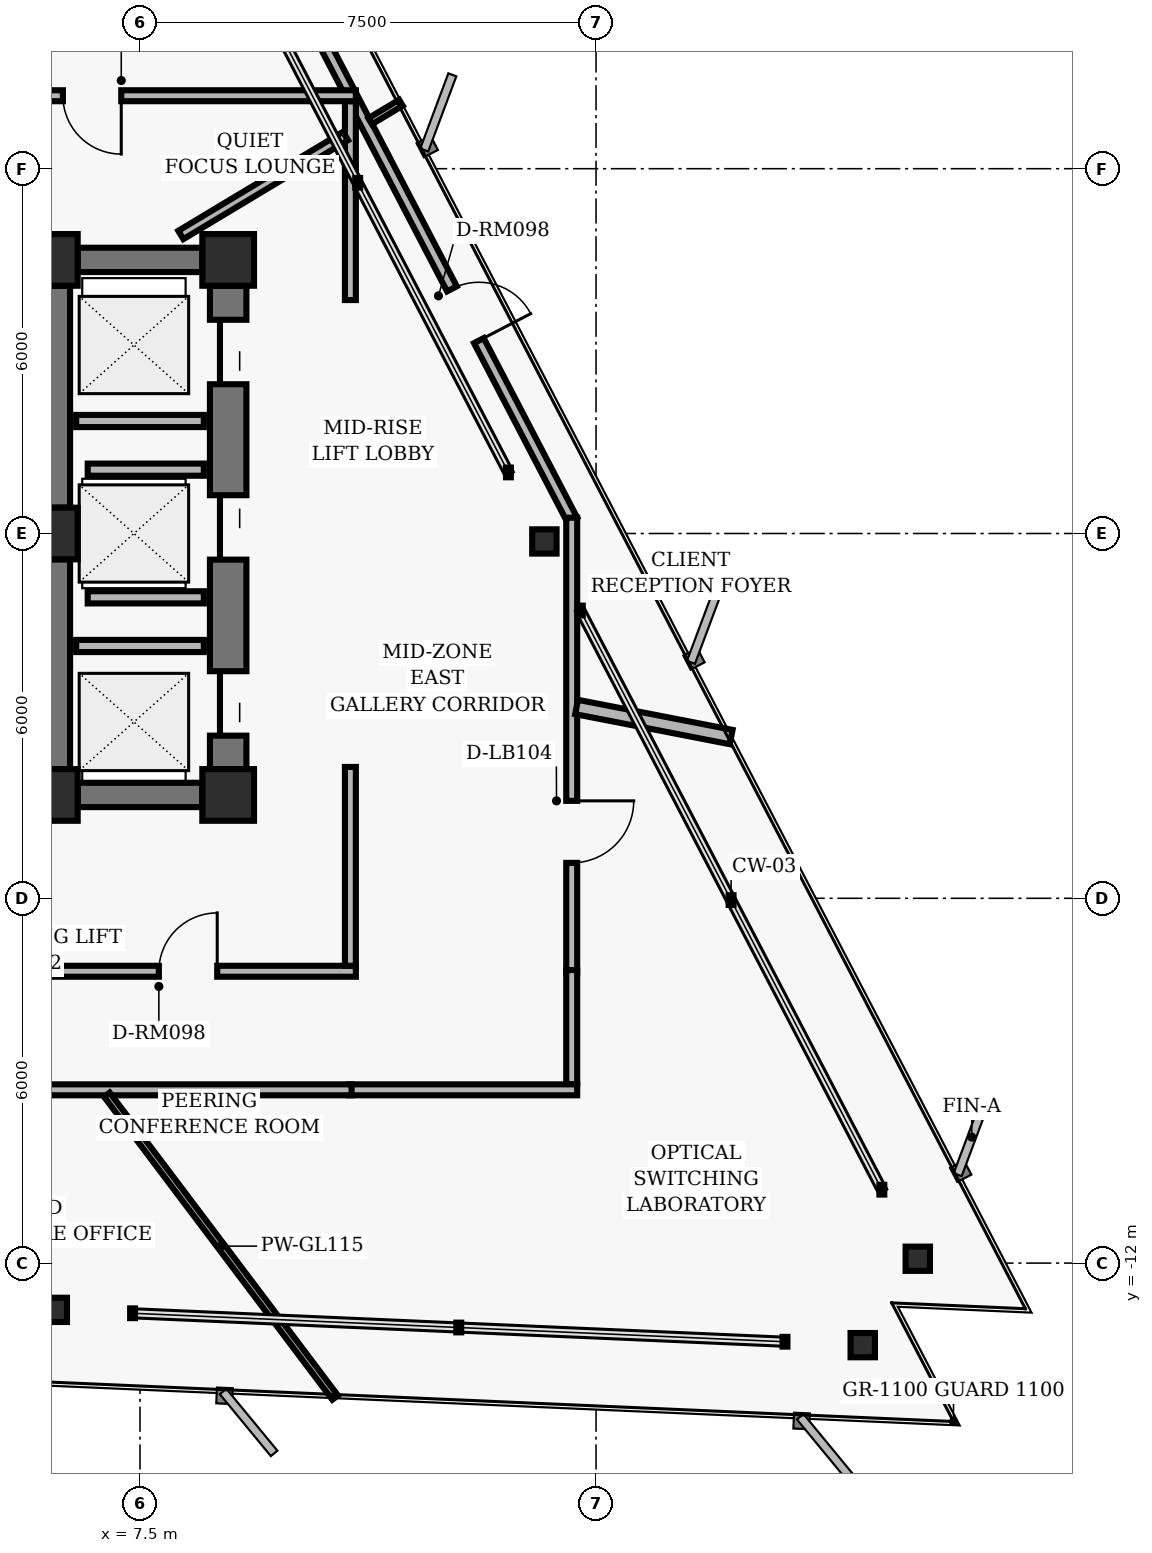
"""IFC4 building model, lengths in metres.
Left out: names, types, materials, properties, quantities, classifications, styles, units other than length and angle.
Written with IfcOpenShell. Run it as: python <this file> out.ifc"""

import sys

from ifc_helpers import new_model, si_unit, direction, frame, frame_2d, origin, origin_2d, place, context, subcontext, project, spatial, rectangle, hollow_rectangle, i_section, extrude, element, fill, save


model = new_model("IFC4")
c1 = context("Model", 3, precision=1e-05, world=origin(), true_north=direction((0.0, 1.0)))
c2 = subcontext(c1, "Body", "Model", "MODEL_VIEW")
j1 = project(units=[si_unit("LENGTHUNIT", "METRE"), si_unit("PLANEANGLEUNIT", "RADIAN")], contexts=[c1])
p1 = place(None, origin())
s1 = spatial("IfcSite", under=j1, at=p1, CompositionType="ELEMENT")
p2 = place(p1, origin())
s2 = spatial("IfcBuilding", under=s1, at=p2, CompositionType="ELEMENT")
p3 = place(p2, frame((0.0, 0.0, 144.16)))
s3 = spatial("IfcBuildingStorey", under=s2, at=p3, CompositionType="ELEMENT", Elevation=144.16)
for number, where, z_axis, x_axis in (
    (1, (6.05, 4.5, 0.0), (0.0, 0.0, 1.0), (1.0, 0.0, 0.0)),
    (2, (6.05, 0.0, 0.0), (0.0, 0.0, 1.0), (1.0, 0.0, 0.0)),
    (3, (6.05, -4.3, 0.0), (0.0, 0.0, 1.0), (1.0, 0.0, 0.0)),
    (4, (8.95, 4.5, 0.0), (0.0, 0.0, 1.0), (1.0, 0.0, 0.0)),
    (5, (8.95, -4.3, 0.0), (0.0, 0.0, 1.0), (1.0, 0.0, 0.0)),
):
    element("IfcColumn", number, at=place(p3, frame(where, z_axis=z_axis, x_axis=x_axis)), inside=s3, PredefinedType="COLUMN", context=c2, shape_type="SweptSolid", body=[
        extrude(hollow_rectangle(XDim=0.85, YDim=0.85, WallThickness=0.055, InnerFilletRadius=0.02, OuterFilletRadius=0.04, at=origin_2d()), origin(), (0.0, 0.0, 1.0), 3.04),
    ])
p4 = place(p3, frame((6.05, 0.425, 0.0), z_axis=(0.0, 0.0, 1.0), x_axis=(0.0, 1.0, 0.0)))
e6 = element("IfcWall", 6, at=p4, inside=s3, PredefinedType="SHEAR", context=c2, shape_type="SweptSolid", body=[
    extrude(rectangle(XDim=3.65, YDim=0.6, at=frame_2d((1.825, 0.0))), origin(), (0.0, 0.0, 1.0), 2.618),
])
p5 = place(p3, frame((6.05, -3.875, 0.0), z_axis=(0.0, 0.0, 1.0), x_axis=(0.0, 1.0, 0.0)))
e7 = element("IfcWall", 7, at=p5, inside=s3, PredefinedType="SHEAR", context=c2, shape_type="SweptSolid", body=[
    extrude(rectangle(XDim=3.45, YDim=0.6, at=frame_2d((1.725, 0.0))), origin(), (0.0, 0.0, 1.0), 2.618),
])
p6 = place(p3, frame((8.95, -3.875, 0.0), z_axis=(0.0, 0.0, 1.0), x_axis=(0.0, 1.0, 0.0)))
e8 = element("IfcWall", 8, at=p6, inside=s3, PredefinedType="SHEAR", context=c2, shape_type="SweptSolid", body=[
    extrude(rectangle(XDim=7.95, YDim=0.6, at=frame_2d((3.975, 0.0))), origin(), (0.0, 0.0, 1.0), 2.618),
])
p7 = place(p6, frame((0.55, 0.0, 0.0)))
e9 = element("IfcOpeningElement", 9, at=p7, cuts=e8, PredefinedType="OPENING", context=c2, shape_type="SweptSolid", body=[
    extrude(rectangle(XDim=1.06, YDim=2.04, at=frame_2d((0.53, 1.02))), frame((0.0, 0.31, 0.0), z_axis=(0.0, -1.0, 0.0), x_axis=(1.0, 0.0, 0.0)), (0.0, 0.0, 1.0), 0.62),
])
p8 = place(p6, frame((3.445, 0.0, 0.0)))
e10 = element("IfcOpeningElement", 10, at=p8, cuts=e8, PredefinedType="OPENING", context=c2, shape_type="SweptSolid", body=[
    extrude(rectangle(XDim=1.06, YDim=2.04, at=frame_2d((0.53, 1.02))), frame((0.0, 0.31, 0.0), z_axis=(0.0, -1.0, 0.0), x_axis=(1.0, 0.0, 0.0)), (0.0, 0.0, 1.0), 0.62),
])
p9 = place(p6, frame((6.33, 0.0, 0.0)))
e11 = element("IfcOpeningElement", 11, at=p9, cuts=e8, PredefinedType="OPENING", context=c2, shape_type="SweptSolid", body=[
    extrude(rectangle(XDim=1.06, YDim=2.04, at=frame_2d((0.53, 1.02))), frame((0.0, 0.31, 0.0), z_axis=(0.0, -1.0, 0.0), x_axis=(1.0, 0.0, 0.0)), (0.0, 0.0, 1.0), 0.62),
])
for number, where, z_axis, x_axis in (
    (12, (6.475, 4.5, 0.0), (0.0, 0.0, 1.0), (1.0, 0.0, 0.0)),
    (13, (6.475, -4.3, 0.0), (0.0, 0.0, 1.0), (1.0, 0.0, 0.0)),
):
    element("IfcWall", number, at=place(p3, frame(where, z_axis=z_axis, x_axis=x_axis)), inside=s3, PredefinedType="SHEAR", context=c2, shape_type="SweptSolid", body=[
        extrude(rectangle(XDim=2.05, YDim=0.4, at=frame_2d((1.025, 0.0))), origin(), (0.0, 0.0, 1.0), 2.618),
    ])
for number, where, z_axis, x_axis in (
    (14, (20.292, -11.928, 0.0), (0.0, 0.0, 1.0), (1.0, 0.0, 0.0)),
    (15, (14.15, -0.131, 0.0), (0.0, 0.0, 1.0), (1.0, 0.0, 0.0)),
    (16, (6.099, -12.769, 0.0), (0.0, 0.0, 1.0), (1.0, 0.0, 0.0)),
    (17, (19.386, -13.349, 0.0), (0.0, 0.0, 1.0), (1.0, 0.0, 0.0)),
):
    element("IfcColumn", number, at=place(p3, frame(where, z_axis=z_axis, x_axis=x_axis)), inside=s3, PredefinedType="COLUMN", context=c2, shape_type="SweptSolid", body=[
        extrude(i_section(OverallWidth=0.401, OverallDepth=0.399, WebThickness=0.025, FlangeThickness=0.04, FilletRadius=0.018, at=origin_2d()), origin(), (0.0, 0.0, 1.0), 3.04),
    ])
for number, where, z_axis, x_axis in (
    (18, (6.45, -1.85, 0.0), (0.0, 0.0, 1.0), (1.0, 0.0, 0.0)),
    (19, (6.45, 1.85, 0.0), (0.0, 0.0, 1.0), (1.0, 0.0, 0.0)),
):
    element("IfcWall", number, at=place(p3, frame(where, z_axis=z_axis, x_axis=x_axis)), inside=s3, PredefinedType="PARTITIONING", context=c2, shape_type="SweptSolid", body=[
        extrude(rectangle(XDim=2.1, YDim=0.2, at=frame_2d((1.05, 0.0))), origin(), (0.0, 0.0, 1.0), 2.593),
    ])
for number, where, z_axis, x_axis in (
    (20, (6.64, -1.05, 0.0), (0.0, 0.0, 1.0), (1.0, 0.0, 0.0)),
    (21, (6.64, 1.05, 0.0), (0.0, 0.0, 1.0), (1.0, 0.0, 0.0)),
):
    element("IfcWall", number, at=place(p3, frame(where, z_axis=z_axis, x_axis=x_axis)), inside=s3, PredefinedType="PARTITIONING", context=c2, shape_type="SweptSolid", body=[
        extrude(rectangle(XDim=1.91, YDim=0.2, at=frame_2d((0.955, 0.0))), origin(), (0.0, 0.0, 1.0), 2.593),
    ])
p10 = place(p3, frame((10.003, 9.07, 0.0), z_axis=(0.0, 0.0, 1.0), x_axis=(0.461740291408, -0.887015165198, 0.0)))
e22 = element("IfcWall", 22, at=p10, inside=s3, PredefinedType="PARTITIONING", context=c2, shape_type="SweptSolid", body=[
    extrude(rectangle(XDim=9.976, YDim=0.18, at=frame_2d((4.988, 0.0))), origin(), (0.0, 0.0, 1.0), 2.593),
])
p11 = place(p10, frame((5.689, 0.0, 0.0)))
e23 = element("IfcOpeningElement", 23, at=p11, cuts=e22, PredefinedType="OPENING", context=c2, shape_type="SweptSolid", body=[
    extrude(rectangle(XDim=0.96, YDim=2.02, at=frame_2d((0.48, 1.01))), frame((0.0, 0.1, 0.0), z_axis=(0.0, -1.0, 0.0), x_axis=(1.0, 0.0, 0.0)), (0.0, 0.0, 1.0), 0.2),
])
p12 = place(p3, frame((14.6, 0.26, 0.0), z_axis=(0.0, 0.0, 1.0), x_axis=(0.0, -1.0, 0.0)))
e24 = element("IfcWall", 24, at=p12, inside=s3, PredefinedType="PARTITIONING", context=c2, shape_type="SweptSolid", body=[
    extrude(rectangle(XDim=7.479, YDim=0.18, at=frame_2d((3.74, 0.0))), origin(), (0.0, 0.0, 1.0), 2.593),
])
p13 = place(p12, frame((4.657, 0.0, 0.0)))
e25 = element("IfcOpeningElement", 25, at=p13, cuts=e24, PredefinedType="OPENING", context=c2, shape_type="SweptSolid", body=[
    extrude(rectangle(XDim=1.02, YDim=2.02, at=frame_2d((0.51, 1.01))), frame((0.0, 0.1, 0.0), z_axis=(0.0, -1.0, 0.0), x_axis=(1.0, 0.0, 0.0)), (0.0, 0.0, 1.0), 0.2),
])
p14 = place(p3, frame((14.6, -7.18, 0.0), z_axis=(0.0, 0.0, 1.0), x_axis=(0.0, -1.0, 0.0)))
e26 = element("IfcWall", 26, at=p14, inside=s3, PredefinedType="PARTITIONING", context=c2, shape_type="SweptSolid", body=[
    extrude(rectangle(XDim=1.88, YDim=0.18, at=frame_2d((0.94, 0.0))), origin(), (0.0, 0.0, 1.0), 2.593),
])
p15 = place(p3, frame((14.69, -9.15, 0.0), z_axis=(0.0, 0.0, 1.0), x_axis=(-1.0, 0.0, 0.0)))
e27 = element("IfcWall", 27, at=p15, inside=s3, PredefinedType="PARTITIONING", context=c2, shape_type="SweptSolid", body=[
    extrude(rectangle(XDim=3.75, YDim=0.18, at=frame_2d((1.875, 0.0))), origin(), (0.0, 0.0, 1.0), 2.16),
])
p16 = place(p3, frame((10.98, -9.15, 0.0), z_axis=(0.0, 0.0, 1.0), x_axis=(-1.0, 0.0, 0.0)))
e28 = element("IfcWall", 28, at=p16, inside=s3, PredefinedType="PARTITIONING", context=c2, shape_type="SweptSolid", body=[
    extrude(rectangle(XDim=17.5, YDim=0.18, at=frame_2d((8.75, 0.0))), origin(), (0.0, 0.0, 1.0), 2.16),
])
p17 = place(p16, frame((13.872, 0.0, 0.0)))
e29 = element("IfcOpeningElement", 29, at=p17, cuts=e28, PredefinedType="OPENING", context=c2, shape_type="SweptSolid", body=[
    extrude(rectangle(XDim=0.96, YDim=2.02, at=frame_2d((0.48, 1.01))), frame((0.0, 0.1, 0.0), z_axis=(0.0, -1.0, 0.0), x_axis=(1.0, 0.0, 0.0)), (0.0, 0.0, 1.0), 0.2),
])
p18 = place(p16, frame((7.256, 0.0, 0.0)))
e30 = element("IfcOpeningElement", 30, at=p18, cuts=e28, PredefinedType="OPENING", context=c2, shape_type="SweptSolid", body=[
    extrude(rectangle(XDim=0.96, YDim=2.02, at=frame_2d((0.48, 1.01))), frame((0.0, 0.1, 0.0), z_axis=(0.0, -1.0, 0.0), x_axis=(1.0, 0.0, 0.0)), (0.0, 0.0, 1.0), 0.2),
])
p19 = place(p3, frame((5.53, -7.2, 0.0), z_axis=(0.0, 0.0, 1.0), x_axis=(1.0, 0.0, 0.0)))
e31 = element("IfcWall", 31, at=p19, inside=s3, PredefinedType="PARTITIONING", context=c2, shape_type="SweptSolid", body=[
    extrude(rectangle(XDim=5.52, YDim=0.18, at=frame_2d((2.76, 0.0))), origin(), (0.0, 0.0, 1.0), 2.16),
])
p20 = place(p19, frame((2.28, 0.0, 0.0)))
e32 = element("IfcOpeningElement", 32, at=p20, cuts=e31, PredefinedType="OPENING", context=c2, shape_type="SweptSolid", body=[
    extrude(rectangle(XDim=0.96, YDim=2.02, at=frame_2d((0.48, 1.01))), frame((0.0, 0.1, 0.0), z_axis=(0.0, -1.0, 0.0), x_axis=(1.0, 0.0, 0.0)), (0.0, 0.0, 1.0), 0.2),
])
for number, where, z_axis, x_axis in (
    (33, (10.96, -7.11, 0.0), (0.0, 0.0, 1.0), (0.0, 1.0, 0.0)),
    (34, (10.96, 3.84, 0.0), (0.0, 0.0, 1.0), (0.0, 1.0, 0.0)),
):
    element("IfcWall", number, at=place(p3, frame(where, z_axis=z_axis, x_axis=x_axis)), inside=s3, PredefinedType="PARTITIONING", context=c2, shape_type="SweptSolid", body=[
        extrude(rectangle(XDim=3.271, YDim=0.18, at=frame_2d((1.635, 0.0))), origin(), (0.0, 0.0, 1.0), 2.593),
    ])
p21 = place(p3, frame((11.05, 7.2, 0.0), z_axis=(0.0, 0.0, 1.0), x_axis=(-1.0, 0.0, 0.0)))
e35 = element("IfcWall", 35, at=p21, inside=s3, PredefinedType="PARTITIONING", context=c2, shape_type="SweptSolid", body=[
    extrude(rectangle(XDim=5.12, YDim=0.18, at=frame_2d((2.56, 0.0))), origin(), (0.0, 0.0, 1.0), 2.593),
])
p22 = place(p21, frame((3.858, 0.0, 0.0)))
e36 = element("IfcOpeningElement", 36, at=p22, cuts=e35, PredefinedType="OPENING", context=c2, shape_type="SweptSolid", body=[
    extrude(rectangle(XDim=0.96, YDim=2.02, at=frame_2d((0.48, 1.01))), frame((0.0, 0.1, 0.0), z_axis=(0.0, -1.0, 0.0), x_axis=(1.0, 0.0, 0.0)), (0.0, 0.0, 1.0), 0.2),
])
p23 = place(p3, frame((6.955, -9.23, 0.0), z_axis=(0.0, 0.0, 1.0), x_axis=(0.60180827309, -0.79864059654, 0.0)))
e37 = element("IfcWall", 37, at=p23, inside=s3, PredefinedType="MOVABLE", context=c2, shape_type="SweptSolid", body=[
    extrude(rectangle(XDim=6.238, YDim=0.115, at=frame_2d((3.119, 0.0))), origin(), (0.0, 0.0, 1.0), 2.593),
])
p24 = place(p3, frame((14.68, -2.854, 0.0), z_axis=(0.0, 0.0, 1.0), x_axis=(0.9816178422, -0.190857045651, 0.0)))
e38 = element("IfcWall", 38, at=p24, inside=s3, PredefinedType="PARTITIONING", context=c2, shape_type="SweptSolid", body=[
    extrude(rectangle(XDim=2.59, YDim=0.24, at=frame_2d((1.295, 0.0))), origin(), (0.0, 0.0, 1.0), 2.593),
])
p25 = place(p3, frame((8.172, 4.91, 0.0), z_axis=(0.0, 0.0, 1.0), x_axis=(0.857145019385, 0.515075155433, 0.0)))
e39 = element("IfcWall", 39, at=p25, inside=s3, PredefinedType="PARTITIONING", context=c2, shape_type="SweptSolid", body=[
    extrude(rectangle(XDim=3.16, YDim=0.16, at=frame_2d((1.58, 0.0))), origin(), (0.0, 0.0, 1.0), 2.593),
])
p26 = place(p3, frame((11.285, 6.781, 0.0), z_axis=(0.0, 0.0, 1.0), x_axis=(0.857237776814, 0.514920764782, 0.0)))
e40 = element("IfcWall", 40, at=p26, inside=s3, PredefinedType="MOVABLE", context=c2, shape_type="SweptSolid", body=[
    extrude(rectangle(XDim=0.591, YDim=0.115, at=frame_2d((0.296, 0.0))), origin(), (0.0, 0.0, 1.0), 2.593),
])
p27 = place(p7, origin())
e41 = element("IfcDoor", 41, at=p27, inside=s3, OperationType="SLIDING_TO_LEFT", PredefinedType="DOOR", context=c2, shape_type="SweptSolid", body=[
    extrude(rectangle(XDim=1.06, YDim=2.04, at=frame_2d((0.53, 1.02))), frame((0.0, 0.025, 0.0), z_axis=(0.0, -1.0, 0.0), x_axis=(1.0, 0.0, 0.0)), (0.0, 0.0, 1.0), 0.05),
])
fill(e9, e41)
p28 = place(p8, origin())
e42 = element("IfcDoor", 42, at=p28, inside=s3, OperationType="SLIDING_TO_RIGHT", PredefinedType="DOOR", context=c2, shape_type="SweptSolid", body=[
    extrude(rectangle(XDim=1.06, YDim=2.04, at=frame_2d((0.53, 1.02))), frame((0.0, 0.025, 0.0), z_axis=(0.0, -1.0, 0.0), x_axis=(1.0, 0.0, 0.0)), (0.0, 0.0, 1.0), 0.05),
])
fill(e10, e42)
p29 = place(p9, origin())
e43 = element("IfcDoor", 43, at=p29, inside=s3, OperationType="SLIDING_TO_LEFT", PredefinedType="DOOR", context=c2, shape_type="SweptSolid", body=[
    extrude(rectangle(XDim=1.06, YDim=2.04, at=frame_2d((0.53, 1.02))), frame((0.0, 0.025, 0.0), z_axis=(0.0, -1.0, 0.0), x_axis=(1.0, 0.0, 0.0)), (0.0, 0.0, 1.0), 0.05),
])
fill(e11, e43)
p30 = place(p20, origin())
e44 = element("IfcDoor", 44, at=p30, inside=s3, OperationType="SINGLE_SWING_RIGHT", PredefinedType="DOOR", context=c2, shape_type="SweptSolid", body=[
    extrude(rectangle(XDim=0.96, YDim=2.02, at=frame_2d((0.48, 1.01))), frame((0.0, 0.025, 0.0), z_axis=(0.0, -1.0, 0.0), x_axis=(1.0, 0.0, 0.0)), (0.0, 0.0, 1.0), 0.05),
])
fill(e32, e44)
p31 = place(p13, origin())
e45 = element("IfcDoor", 45, at=p31, inside=s3, OperationType="SINGLE_SWING_LEFT", PredefinedType="DOOR", context=c2, shape_type="SweptSolid", body=[
    extrude(rectangle(XDim=1.02, YDim=2.02, at=frame_2d((0.51, 1.01))), frame((0.0, 0.025, 0.0), z_axis=(0.0, -1.0, 0.0), x_axis=(1.0, 0.0, 0.0)), (0.0, 0.0, 1.0), 0.05),
])
fill(e25, e45)
p32 = place(p11, origin())
e46 = element("IfcDoor", 46, at=p32, inside=s3, OperationType="SINGLE_SWING_RIGHT", PredefinedType="DOOR", context=c2, shape_type="SweptSolid", body=[
    extrude(rectangle(XDim=0.96, YDim=2.02, at=frame_2d((0.48, 1.01))), frame((0.0, 0.025, 0.0), z_axis=(0.0, -1.0, 0.0), x_axis=(1.0, 0.0, 0.0)), (0.0, 0.0, 1.0), 0.05),
])
fill(e23, e46)
p33 = place(p22, origin())
e47 = element("IfcDoor", 47, at=p33, inside=s3, OperationType="SINGLE_SWING_LEFT", PredefinedType="DOOR", context=c2, shape_type="SweptSolid", body=[
    extrude(rectangle(XDim=0.96, YDim=2.02, at=frame_2d((0.48, 1.01))), frame((0.0, 0.025, 0.0), z_axis=(0.0, -1.0, 0.0), x_axis=(1.0, 0.0, 0.0)), (0.0, 0.0, 1.0), 0.05),
])
fill(e36, e47)
save(model, sys.argv[1])
